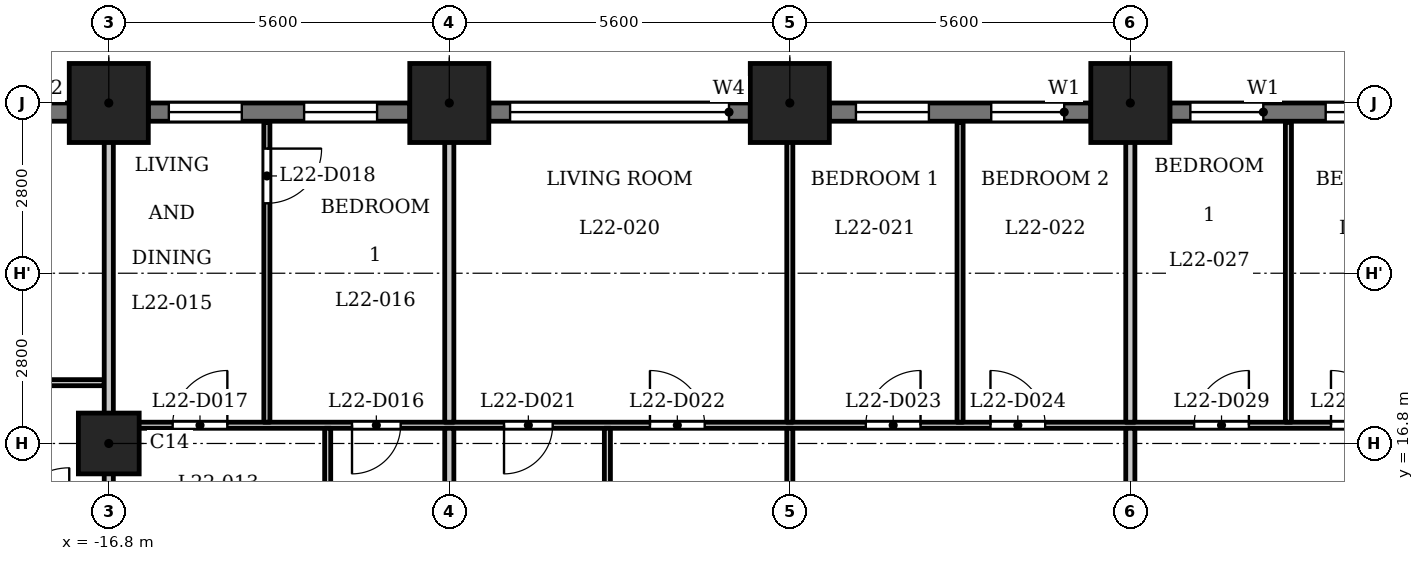
"""IFC4 building model, lengths in metres.
Left out: names, types, materials, properties, quantities, classifications, styles, units other than length and angle.
Written with IfcOpenShell. Run it as: python <this file> out.ifc"""

import sys

from ifc_helpers import new_model, si_unit, direction, frame, frame_2d, origin, origin_2d, place, context, subcontext, project, spatial, rectangle, extrude, element, fill, save


model = new_model("IFC4")
c1 = context("Model", 3, precision=1e-05, world=origin(), true_north=direction((0.0, 1.0)))
c2 = subcontext(c1, "Body", "Model", "MODEL_VIEW")
j1 = project(units=[si_unit("LENGTHUNIT", "METRE"), si_unit("PLANEANGLEUNIT", "RADIAN")], contexts=[c1])
p1 = place(None, origin())
s1 = spatial("IfcSite", under=j1, at=p1, CompositionType="ELEMENT")
p2 = place(p1, origin())
s2 = spatial("IfcBuilding", under=s1, at=p2, CompositionType="ELEMENT")
p3 = place(p2, frame((0.0, 0.0, 90.3)))
s3 = spatial("IfcBuildingStorey", under=s2, at=p3, CompositionType="ELEMENT", Elevation=90.3)
for number, where, z_axis, x_axis in (
    (1, (0.0, 22.4, 0.0), (0.0, 0.0, 1.0), (1.0, 0.0, 0.0)),
    (2, (-5.6, 22.4, 0.0), (0.0, 0.0, 1.0), (1.0, 0.0, 0.0)),
    (3, (-11.2, 22.4, 0.0), (0.0, 0.0, 1.0), (1.0, 0.0, 0.0)),
    (4, (-16.8, 22.4, 0.0), (0.0, 0.0, 1.0), (1.0, 0.0, 0.0)),
):
    element("IfcColumn", number, at=place(p3, frame(where, z_axis=z_axis, x_axis=x_axis)), inside=s3, PredefinedType="COLUMN", context=c2, shape_type="SweptSolid", body=[
        extrude(rectangle(XDim=1.3, YDim=1.3, at=origin_2d()), origin(), (0.0, 0.0, 1.0), 3.5),
    ])
p4 = place(p3, frame((-16.8, 16.8, 0.0), z_axis=(0.0, 0.0, 1.0), x_axis=(1.0, 0.0, 0.0)))
e5 = element("IfcColumn", 5, at=p4, inside=s3, PredefinedType="COLUMN", context=c2, shape_type="SweptSolid", body=[
    extrude(rectangle(XDim=1.0, YDim=1.0, at=origin_2d()), origin(), (0.0, 0.0, 1.0), 3.5),
])
p5 = place(p3, frame((4.95, 22.25, 0.0), z_axis=(0.0, 0.0, 1.0), x_axis=(-1.0, 0.0, 0.0)))
e6 = element("IfcWall", 6, at=p5, inside=s3, PredefinedType="SOLIDWALL", context=c2, shape_type="SweptSolid", body=[
    extrude(rectangle(XDim=4.3, YDim=0.3, at=frame_2d((2.15, 0.0))), origin(), (0.0, 0.0, 1.0), 2.4),
])
p6 = place(p5, frame((0.538, 0.0, 0.6)))
e7 = element("IfcOpeningElement", 7, at=p6, cuts=e6, PredefinedType="OPENING", context=c2, shape_type="SweptSolid", body=[
    extrude(rectangle(XDim=1.2, YDim=1.55, at=frame_2d((0.6, 0.775))), frame((0.0, 0.16, 0.0), z_axis=(0.0, -1.0, 0.0), x_axis=(1.0, 0.0, 0.0)), (0.0, 0.0, 1.0), 0.32),
])
p7 = place(p5, frame((2.762, 0.0, 0.6)))
e8 = element("IfcOpeningElement", 8, at=p7, cuts=e6, PredefinedType="OPENING", context=c2, shape_type="SweptSolid", body=[
    extrude(rectangle(XDim=1.2, YDim=1.55, at=frame_2d((0.6, 0.775))), frame((0.0, 0.16, 0.0), z_axis=(0.0, -1.0, 0.0), x_axis=(1.0, 0.0, 0.0)), (0.0, 0.0, 1.0), 0.32),
])
p8 = place(p3, frame((-0.65, 22.25, 0.0), z_axis=(0.0, 0.0, 1.0), x_axis=(-1.0, 0.0, 0.0)))
e9 = element("IfcWall", 9, at=p8, inside=s3, PredefinedType="SOLIDWALL", context=c2, shape_type="SweptSolid", body=[
    extrude(rectangle(XDim=4.3, YDim=0.3, at=frame_2d((2.15, 0.0))), origin(), (0.0, 0.0, 1.0), 2.4),
])
p9 = place(p8, frame((0.438, 0.0, 0.6)))
e10 = element("IfcOpeningElement", 10, at=p9, cuts=e9, PredefinedType="OPENING", context=c2, shape_type="SweptSolid", body=[
    extrude(rectangle(XDim=1.2, YDim=1.55, at=frame_2d((0.6, 0.775))), frame((0.0, 0.16, 0.0), z_axis=(0.0, -1.0, 0.0), x_axis=(1.0, 0.0, 0.0)), (0.0, 0.0, 1.0), 0.32),
])
p10 = place(p8, frame((2.663, 0.0, 0.6)))
e11 = element("IfcOpeningElement", 11, at=p10, cuts=e9, PredefinedType="OPENING", context=c2, shape_type="SweptSolid", body=[
    extrude(rectangle(XDim=1.2, YDim=1.55, at=frame_2d((0.6, 0.775))), frame((0.0, 0.16, 0.0), z_axis=(0.0, -1.0, 0.0), x_axis=(1.0, 0.0, 0.0)), (0.0, 0.0, 1.0), 0.32),
])
p11 = place(p3, frame((-6.25, 22.25, 0.0), z_axis=(0.0, 0.0, 1.0), x_axis=(-1.0, 0.0, 0.0)))
e12 = element("IfcWall", 12, at=p11, inside=s3, PredefinedType="SOLIDWALL", context=c2, shape_type="SweptSolid", body=[
    extrude(rectangle(XDim=4.3, YDim=0.3, at=frame_2d((2.15, 0.0))), origin(), (0.0, 0.0, 1.0), 2.4),
])
p12 = place(p11, frame((0.35, 0.0, 1.2)))
e13 = element("IfcOpeningElement", 13, at=p12, cuts=e12, PredefinedType="OPENING", context=c2, shape_type="SweptSolid", body=[
    extrude(rectangle(XDim=3.6, YDim=0.95, at=frame_2d((1.8, 0.475))), frame((0.0, 0.16, 0.0), z_axis=(0.0, -1.0, 0.0), x_axis=(1.0, 0.0, 0.0)), (0.0, 0.0, 1.0), 0.32),
])
p13 = place(p3, frame((-11.85, 22.25, 0.0), z_axis=(0.0, 0.0, 1.0), x_axis=(-1.0, 0.0, 0.0)))
e14 = element("IfcWall", 14, at=p13, inside=s3, PredefinedType="SOLIDWALL", context=c2, shape_type="SweptSolid", body=[
    extrude(rectangle(XDim=4.3, YDim=0.3, at=frame_2d((2.15, 0.0))), origin(), (0.0, 0.0, 1.0), 2.4),
])
p14 = place(p13, frame((0.538, 0.0, 0.6)))
e15 = element("IfcOpeningElement", 15, at=p14, cuts=e14, PredefinedType="OPENING", context=c2, shape_type="SweptSolid", body=[
    extrude(rectangle(XDim=1.2, YDim=1.55, at=frame_2d((0.6, 0.775))), frame((0.0, 0.16, 0.0), z_axis=(0.0, -1.0, 0.0), x_axis=(1.0, 0.0, 0.0)), (0.0, 0.0, 1.0), 0.32),
])
p15 = place(p13, frame((2.762, 0.0, 0.6)))
e16 = element("IfcOpeningElement", 16, at=p15, cuts=e14, PredefinedType="OPENING", context=c2, shape_type="SweptSolid", body=[
    extrude(rectangle(XDim=1.2, YDim=1.55, at=frame_2d((0.6, 0.775))), frame((0.0, 0.16, 0.0), z_axis=(0.0, -1.0, 0.0), x_axis=(1.0, 0.0, 0.0)), (0.0, 0.0, 1.0), 0.32),
])
p16 = place(p3, frame((-17.45, 22.25, 0.0), z_axis=(0.0, 0.0, 1.0), x_axis=(-1.0, 0.0, 0.0)))
e17 = element("IfcWall", 17, at=p16, inside=s3, PredefinedType="SOLIDWALL", context=c2, shape_type="SweptSolid", body=[
    extrude(rectangle(XDim=2.55, YDim=0.3, at=frame_2d((1.275, 0.0))), origin(), (0.0, 0.0, 1.0), 2.4),
])
p17 = place(p16, frame((0.375, 0.0, 0.9)))
e18 = element("IfcOpeningElement", 18, at=p17, cuts=e17, PredefinedType="OPENING", context=c2, shape_type="SweptSolid", body=[
    extrude(rectangle(XDim=1.8, YDim=1.25, at=frame_2d((0.9, 0.625))), frame((0.0, 0.16, 0.0), z_axis=(0.0, -1.0, 0.0), x_axis=(1.0, 0.0, 0.0)), (0.0, 0.0, 1.0), 0.32),
])
p18 = place(p3, frame((-16.725, 17.1, 0.0), z_axis=(0.0, 0.0, 1.0), x_axis=(1.0, 0.0, 0.0)))
e19 = element("IfcWall", 19, at=p18, inside=s3, PredefinedType="PARTITIONING", context=c2, shape_type="SweptSolid", body=[
    extrude(rectangle(XDim=33.45, YDim=0.1, at=frame_2d((16.725, 0.0))), origin(), (0.0, 0.0, 1.0), 3.2),
])
p19 = place(p18, frame((3.925, 0.0, 0.0)))
e20 = element("IfcOpeningElement", 20, at=p19, cuts=e19, PredefinedType="OPENING", context=c2, shape_type="SweptSolid", body=[
    extrude(rectangle(XDim=0.8, YDim=2.1, at=frame_2d((0.4, 1.05))), frame((0.0, 0.06, 0.0), z_axis=(0.0, -1.0, 0.0), x_axis=(1.0, 0.0, 0.0)), (0.0, 0.0, 1.0), 0.12),
])
p20 = place(p18, frame((0.975, 0.0, 0.0)))
e21 = element("IfcOpeningElement", 21, at=p20, cuts=e19, PredefinedType="OPENING", context=c2, shape_type="SweptSolid", body=[
    extrude(rectangle(XDim=0.9, YDim=2.1, at=frame_2d((0.45, 1.05))), frame((0.0, 0.06, 0.0), z_axis=(0.0, -1.0, 0.0), x_axis=(1.0, 0.0, 0.0)), (0.0, 0.0, 1.0), 0.12),
])
p21 = place(p18, frame((6.425, 0.0, 0.0)))
e22 = element("IfcOpeningElement", 22, at=p21, cuts=e19, PredefinedType="OPENING", context=c2, shape_type="SweptSolid", body=[
    extrude(rectangle(XDim=0.8, YDim=2.1, at=frame_2d((0.4, 1.05))), frame((0.0, 0.06, 0.0), z_axis=(0.0, -1.0, 0.0), x_axis=(1.0, 0.0, 0.0)), (0.0, 0.0, 1.0), 0.12),
])
p22 = place(p18, frame((8.825, 0.0, 0.0)))
e23 = element("IfcOpeningElement", 23, at=p22, cuts=e19, PredefinedType="OPENING", context=c2, shape_type="SweptSolid", body=[
    extrude(rectangle(XDim=0.9, YDim=2.1, at=frame_2d((0.45, 1.05))), frame((0.0, 0.06, 0.0), z_axis=(0.0, -1.0, 0.0), x_axis=(1.0, 0.0, 0.0)), (0.0, 0.0, 1.0), 0.12),
])
p23 = place(p18, frame((12.375, 0.0, 0.0)))
e24 = element("IfcOpeningElement", 24, at=p23, cuts=e19, PredefinedType="OPENING", context=c2, shape_type="SweptSolid", body=[
    extrude(rectangle(XDim=0.9, YDim=2.1, at=frame_2d((0.45, 1.05))), frame((0.0, 0.06, 0.0), z_axis=(0.0, -1.0, 0.0), x_axis=(1.0, 0.0, 0.0)), (0.0, 0.0, 1.0), 0.12),
])
p24 = place(p18, frame((14.425, 0.0, 0.0)))
e25 = element("IfcOpeningElement", 25, at=p24, cuts=e19, PredefinedType="OPENING", context=c2, shape_type="SweptSolid", body=[
    extrude(rectangle(XDim=0.9, YDim=2.1, at=frame_2d((0.45, 1.05))), frame((0.0, 0.06, 0.0), z_axis=(0.0, -1.0, 0.0), x_axis=(1.0, 0.0, 0.0)), (0.0, 0.0, 1.0), 0.12),
])
p25 = place(p18, frame((26.225, 0.0, 0.0)))
e26 = element("IfcOpeningElement", 26, at=p25, cuts=e19, PredefinedType="OPENING", context=c2, shape_type="SweptSolid", body=[
    extrude(rectangle(XDim=0.8, YDim=2.1, at=frame_2d((0.4, 1.05))), frame((0.0, 0.06, 0.0), z_axis=(0.0, -1.0, 0.0), x_axis=(1.0, 0.0, 0.0)), (0.0, 0.0, 1.0), 0.12),
])
p26 = place(p18, frame((23.025, 0.0, 0.0)))
e27 = element("IfcOpeningElement", 27, at=p26, cuts=e19, PredefinedType="OPENING", context=c2, shape_type="SweptSolid", body=[
    extrude(rectangle(XDim=0.9, YDim=2.1, at=frame_2d((0.45, 1.05))), frame((0.0, 0.06, 0.0), z_axis=(0.0, -1.0, 0.0), x_axis=(1.0, 0.0, 0.0)), (0.0, 0.0, 1.0), 0.12),
])
p27 = place(p18, frame((17.775, 0.0, 0.0)))
e28 = element("IfcOpeningElement", 28, at=p27, cuts=e19, PredefinedType="OPENING", context=c2, shape_type="SweptSolid", body=[
    extrude(rectangle(XDim=0.9, YDim=2.1, at=frame_2d((0.45, 1.05))), frame((0.0, 0.06, 0.0), z_axis=(0.0, -1.0, 0.0), x_axis=(1.0, 0.0, 0.0)), (0.0, 0.0, 1.0), 0.12),
])
p28 = place(p18, frame((20.025, 0.0, 0.0)))
e29 = element("IfcOpeningElement", 29, at=p28, cuts=e19, PredefinedType="OPENING", context=c2, shape_type="SweptSolid", body=[
    extrude(rectangle(XDim=0.9, YDim=2.1, at=frame_2d((0.45, 1.05))), frame((0.0, 0.06, 0.0), z_axis=(0.0, -1.0, 0.0), x_axis=(1.0, 0.0, 0.0)), (0.0, 0.0, 1.0), 0.12),
])
p29 = place(p18, frame((28.825, 0.0, 0.0)))
e30 = element("IfcOpeningElement", 30, at=p29, cuts=e19, PredefinedType="OPENING", context=c2, shape_type="SweptSolid", body=[
    extrude(rectangle(XDim=0.8, YDim=2.1, at=frame_2d((0.4, 1.05))), frame((0.0, 0.06, 0.0), z_axis=(0.0, -1.0, 0.0), x_axis=(1.0, 0.0, 0.0)), (0.0, 0.0, 1.0), 0.12),
])
p30 = place(p18, frame((31.975, 0.0, 0.0)))
e31 = element("IfcOpeningElement", 31, at=p30, cuts=e19, PredefinedType="OPENING", context=c2, shape_type="SweptSolid", body=[
    extrude(rectangle(XDim=0.9, YDim=2.1, at=frame_2d((0.45, 1.05))), frame((0.0, 0.06, 0.0), z_axis=(0.0, -1.0, 0.0), x_axis=(1.0, 0.0, 0.0)), (0.0, 0.0, 1.0), 0.12),
])
p31 = place(p3, frame((-26.554, 17.8, 0.0), z_axis=(0.0, 0.0, 1.0), x_axis=(1.0, 0.0, 0.0)))
e32 = element("IfcWall", 32, at=p31, inside=s3, PredefinedType="PARTITIONING", context=c2, shape_type="SweptSolid", body=[
    extrude(rectangle(XDim=9.679, YDim=0.1, at=frame_2d((4.84, 0.0))), origin(), (0.0, 0.0, 1.0), 3.2),
])
p32 = place(p31, frame((2.786, 0.0, 0.0)))
e33 = element("IfcOpeningElement", 33, at=p32, cuts=e32, PredefinedType="OPENING", context=c2, shape_type="SweptSolid", body=[
    extrude(rectangle(XDim=0.8, YDim=2.1, at=frame_2d((0.4, 1.05))), frame((0.0, 0.06, 0.0), z_axis=(0.0, -1.0, 0.0), x_axis=(1.0, 0.0, 0.0)), (0.0, 0.0, 1.0), 0.12),
])
p33 = place(p31, frame((7.204, 0.0, 0.0)))
e34 = element("IfcOpeningElement", 34, at=p33, cuts=e32, PredefinedType="OPENING", context=c2, shape_type="SweptSolid", body=[
    extrude(rectangle(XDim=0.9, YDim=2.1, at=frame_2d((0.45, 1.05))), frame((0.0, 0.06, 0.0), z_axis=(0.0, -1.0, 0.0), x_axis=(1.0, 0.0, 0.0)), (0.0, 0.0, 1.0), 0.12),
])
p34 = place(p3, frame((-16.8, 15.475, 0.0), z_axis=(0.0, 0.0, 1.0), x_axis=(0.0, 1.0, 0.0)))
e35 = element("IfcWall", 35, at=p34, inside=s3, PredefinedType="PARTITIONING", context=c2, shape_type="SweptSolid", body=[
    extrude(rectangle(XDim=7.555, YDim=0.15, at=frame_2d((3.777, 0.0))), origin(), (0.0, 0.0, 1.0), 3.2),
])
p35 = place(p3, frame((-14.2, 17.15, 0.0), z_axis=(0.0, 0.0, 1.0), x_axis=(0.0, 1.0, 0.0)))
e36 = element("IfcWall", 36, at=p35, inside=s3, PredefinedType="PARTITIONING", context=c2, shape_type="SweptSolid", body=[
    extrude(rectangle(XDim=4.93, YDim=0.1, at=frame_2d((2.465, 0.0))), origin(), (0.0, 0.0, 1.0), 3.2),
])
p36 = place(p35, frame((3.6, 0.0, 0.0)))
e37 = element("IfcOpeningElement", 37, at=p36, cuts=e36, PredefinedType="OPENING", context=c2, shape_type="SweptSolid", body=[
    extrude(rectangle(XDim=0.9, YDim=2.1, at=frame_2d((0.45, 1.05))), frame((0.0, 0.06, 0.0), z_axis=(0.0, -1.0, 0.0), x_axis=(1.0, 0.0, 0.0)), (0.0, 0.0, 1.0), 0.12),
])
p37 = place(p3, frame((-13.2, 13.275, 0.0), z_axis=(0.0, 0.0, 1.0), x_axis=(0.0, 1.0, 0.0)))
e38 = element("IfcWall", 38, at=p37, inside=s3, PredefinedType="PARTITIONING", context=c2, shape_type="SweptSolid", body=[
    extrude(rectangle(XDim=3.775, YDim=0.1, at=frame_2d((1.888, 0.0))), origin(), (0.0, 0.0, 1.0), 3.2),
])
p38 = place(p3, frame((-11.2, 13.275, 0.0), z_axis=(0.0, 0.0, 1.0), x_axis=(0.0, 1.0, 0.0)))
e39 = element("IfcWall", 39, at=p38, inside=s3, PredefinedType="PARTITIONING", context=c2, shape_type="SweptSolid", body=[
    extrude(rectangle(XDim=3.775, YDim=0.15, at=frame_2d((1.888, 0.0))), origin(), (0.0, 0.0, 1.0), 3.2),
])
p39 = place(p3, frame((-11.2, 17.15, 0.0), z_axis=(0.0, 0.0, 1.0), x_axis=(0.0, 1.0, 0.0)))
e40 = element("IfcWall", 40, at=p39, inside=s3, PredefinedType="PARTITIONING", context=c2, shape_type="SweptSolid", body=[
    extrude(rectangle(XDim=5.88, YDim=0.15, at=frame_2d((2.94, 0.0))), origin(), (0.0, 0.0, 1.0), 3.2),
])
p40 = place(p3, frame((-8.6, 13.275, 0.0), z_axis=(0.0, 0.0, 1.0), x_axis=(0.0, 1.0, 0.0)))
e41 = element("IfcWall", 41, at=p40, inside=s3, PredefinedType="PARTITIONING", context=c2, shape_type="SweptSolid", body=[
    extrude(rectangle(XDim=3.775, YDim=0.1, at=frame_2d((1.888, 0.0))), origin(), (0.0, 0.0, 1.0), 3.2),
])
p41 = place(p3, frame((-5.6, 13.275, 0.0), z_axis=(0.0, 0.0, 1.0), x_axis=(0.0, 1.0, 0.0)))
e42 = element("IfcWall", 42, at=p41, inside=s3, PredefinedType="PARTITIONING", context=c2, shape_type="SweptSolid", body=[
    extrude(rectangle(XDim=3.775, YDim=0.1, at=frame_2d((1.888, 0.0))), origin(), (0.0, 0.0, 1.0), 3.2),
])
p42 = place(p41, frame((0.525, 0.0, 0.0)))
e43 = element("IfcOpeningElement", 43, at=p42, cuts=e42, PredefinedType="OPENING", context=c2, shape_type="SweptSolid", body=[
    extrude(rectangle(XDim=0.9, YDim=2.1, at=frame_2d((0.45, 1.05))), frame((0.0, 0.06, 0.0), z_axis=(0.0, -1.0, 0.0), x_axis=(1.0, 0.0, 0.0)), (0.0, 0.0, 1.0), 0.12),
])
p43 = place(p3, frame((-5.6, 17.15, 0.0), z_axis=(0.0, 0.0, 1.0), x_axis=(0.0, 1.0, 0.0)))
e44 = element("IfcWall", 44, at=p43, inside=s3, PredefinedType="PARTITIONING", context=c2, shape_type="SweptSolid", body=[
    extrude(rectangle(XDim=5.88, YDim=0.1, at=frame_2d((2.94, 0.0))), origin(), (0.0, 0.0, 1.0), 3.2),
])
p44 = place(p3, frame((-2.8, 17.15, 0.0), z_axis=(0.0, 0.0, 1.0), x_axis=(0.0, 1.0, 0.0)))
e45 = element("IfcWall", 45, at=p44, inside=s3, PredefinedType="PARTITIONING", context=c2, shape_type="SweptSolid", body=[
    extrude(rectangle(XDim=4.93, YDim=0.1, at=frame_2d((2.465, 0.0))), origin(), (0.0, 0.0, 1.0), 3.2),
])
p45 = place(p3, frame((0.0, 13.275, 0.0), z_axis=(0.0, 0.0, 1.0), x_axis=(0.0, 1.0, 0.0)))
e46 = element("IfcWall", 46, at=p45, inside=s3, PredefinedType="PARTITIONING", context=c2, shape_type="SweptSolid", body=[
    extrude(rectangle(XDim=3.775, YDim=0.15, at=frame_2d((1.888, 0.0))), origin(), (0.0, 0.0, 1.0), 3.2),
])
p46 = place(p3, frame((0.0, 17.15, 0.0), z_axis=(0.0, 0.0, 1.0), x_axis=(0.0, 1.0, 0.0)))
e47 = element("IfcWall", 47, at=p46, inside=s3, PredefinedType="PARTITIONING", context=c2, shape_type="SweptSolid", body=[
    extrude(rectangle(XDim=5.88, YDim=0.15, at=frame_2d((2.94, 0.0))), origin(), (0.0, 0.0, 1.0), 3.2),
])
p47 = place(p3, frame((2.6, 17.15, 0.0), z_axis=(0.0, 0.0, 1.0), x_axis=(0.0, 1.0, 0.0)))
e48 = element("IfcWall", 48, at=p47, inside=s3, PredefinedType="PARTITIONING", context=c2, shape_type="SweptSolid", body=[
    extrude(rectangle(XDim=4.93, YDim=0.1, at=frame_2d((2.465, 0.0))), origin(), (0.0, 0.0, 1.0), 3.2),
])
p48 = place(p19, origin())
e49 = element("IfcDoor", 49, at=p48, inside=s3, OperationType="SINGLE_SWING_LEFT", PredefinedType="DOOR", context=c2, shape_type="SweptSolid", body=[
    extrude(rectangle(XDim=0.8, YDim=2.1, at=frame_2d((0.4, 1.05))), frame((0.0, 0.025, 0.0), z_axis=(0.0, -1.0, 0.0), x_axis=(1.0, 0.0, 0.0)), (0.0, 0.0, 1.0), 0.05),
])
fill(e20, e49)
p49 = place(p20, origin())
e50 = element("IfcDoor", 50, at=p49, inside=s3, OperationType="SINGLE_SWING_LEFT", PredefinedType="DOOR", context=c2, shape_type="SweptSolid", body=[
    extrude(rectangle(XDim=0.9, YDim=2.1, at=frame_2d((0.45, 1.05))), frame((0.0, 0.025, 0.0), z_axis=(0.0, -1.0, 0.0), x_axis=(1.0, 0.0, 0.0)), (0.0, 0.0, 1.0), 0.05),
])
fill(e21, e50)
p50 = place(p36, origin())
e51 = element("IfcDoor", 51, at=p50, inside=s3, OperationType="SINGLE_SWING_RIGHT", PredefinedType="DOOR", context=c2, shape_type="SweptSolid", body=[
    extrude(rectangle(XDim=0.9, YDim=2.1, at=frame_2d((0.45, 1.05))), frame((0.0, 0.025, 0.0), z_axis=(0.0, -1.0, 0.0), x_axis=(1.0, 0.0, 0.0)), (0.0, 0.0, 1.0), 0.05),
])
fill(e37, e51)
p51 = place(p21, origin())
e52 = element("IfcDoor", 52, at=p51, inside=s3, OperationType="SINGLE_SWING_LEFT", PredefinedType="DOOR", context=c2, shape_type="SweptSolid", body=[
    extrude(rectangle(XDim=0.8, YDim=2.1, at=frame_2d((0.4, 1.05))), frame((0.0, 0.025, 0.0), z_axis=(0.0, -1.0, 0.0), x_axis=(1.0, 0.0, 0.0)), (0.0, 0.0, 1.0), 0.05),
])
fill(e22, e52)
p52 = place(p22, origin())
e53 = element("IfcDoor", 53, at=p52, inside=s3, OperationType="SINGLE_SWING_RIGHT", PredefinedType="DOOR", context=c2, shape_type="SweptSolid", body=[
    extrude(rectangle(XDim=0.9, YDim=2.1, at=frame_2d((0.45, 1.05))), frame((0.0, 0.025, 0.0), z_axis=(0.0, -1.0, 0.0), x_axis=(1.0, 0.0, 0.0)), (0.0, 0.0, 1.0), 0.05),
])
fill(e23, e53)
p53 = place(p23, origin())
e54 = element("IfcDoor", 54, at=p53, inside=s3, OperationType="SINGLE_SWING_LEFT", PredefinedType="DOOR", context=c2, shape_type="SweptSolid", body=[
    extrude(rectangle(XDim=0.9, YDim=2.1, at=frame_2d((0.45, 1.05))), frame((0.0, 0.025, 0.0), z_axis=(0.0, -1.0, 0.0), x_axis=(1.0, 0.0, 0.0)), (0.0, 0.0, 1.0), 0.05),
])
fill(e24, e54)
p54 = place(p24, origin())
e55 = element("IfcDoor", 55, at=p54, inside=s3, OperationType="SINGLE_SWING_RIGHT", PredefinedType="DOOR", context=c2, shape_type="SweptSolid", body=[
    extrude(rectangle(XDim=0.9, YDim=2.1, at=frame_2d((0.45, 1.05))), frame((0.0, 0.025, 0.0), z_axis=(0.0, -1.0, 0.0), x_axis=(1.0, 0.0, 0.0)), (0.0, 0.0, 1.0), 0.05),
])
fill(e25, e55)
p55 = place(p27, origin())
e56 = element("IfcDoor", 56, at=p55, inside=s3, OperationType="SINGLE_SWING_LEFT", PredefinedType="DOOR", context=c2, shape_type="SweptSolid", body=[
    extrude(rectangle(XDim=0.9, YDim=2.1, at=frame_2d((0.45, 1.05))), frame((0.0, 0.025, 0.0), z_axis=(0.0, -1.0, 0.0), x_axis=(1.0, 0.0, 0.0)), (0.0, 0.0, 1.0), 0.05),
])
fill(e28, e56)
p56 = place(p28, origin())
e57 = element("IfcDoor", 57, at=p56, inside=s3, OperationType="SINGLE_SWING_RIGHT", PredefinedType="DOOR", context=c2, shape_type="SweptSolid", body=[
    extrude(rectangle(XDim=0.9, YDim=2.1, at=frame_2d((0.45, 1.05))), frame((0.0, 0.025, 0.0), z_axis=(0.0, -1.0, 0.0), x_axis=(1.0, 0.0, 0.0)), (0.0, 0.0, 1.0), 0.05),
])
fill(e29, e57)
p57 = place(p6, origin())
e58 = element("IfcWindow", 58, at=p57, inside=s3, PartitioningType="SINGLE_PANEL", PredefinedType="WINDOW", context=c2, shape_type="SweptSolid", body=[
    extrude(rectangle(XDim=1.2, YDim=1.55, at=frame_2d((0.6, 0.775))), frame((0.0, 0.03, 0.0), z_axis=(0.0, -1.0, 0.0), x_axis=(1.0, 0.0, 0.0)), (0.0, 0.0, 1.0), 0.06),
])
fill(e7, e58)
p58 = place(p7, origin())
e59 = element("IfcWindow", 59, at=p58, inside=s3, PartitioningType="SINGLE_PANEL", PredefinedType="WINDOW", context=c2, shape_type="SweptSolid", body=[
    extrude(rectangle(XDim=1.2, YDim=1.55, at=frame_2d((0.6, 0.775))), frame((0.0, 0.03, 0.0), z_axis=(0.0, -1.0, 0.0), x_axis=(1.0, 0.0, 0.0)), (0.0, 0.0, 1.0), 0.06),
])
fill(e8, e59)
p59 = place(p9, origin())
e60 = element("IfcWindow", 60, at=p59, inside=s3, PartitioningType="SINGLE_PANEL", PredefinedType="WINDOW", context=c2, shape_type="SweptSolid", body=[
    extrude(rectangle(XDim=1.2, YDim=1.55, at=frame_2d((0.6, 0.775))), frame((0.0, 0.03, 0.0), z_axis=(0.0, -1.0, 0.0), x_axis=(1.0, 0.0, 0.0)), (0.0, 0.0, 1.0), 0.06),
])
fill(e10, e60)
p60 = place(p10, origin())
e61 = element("IfcWindow", 61, at=p60, inside=s3, PartitioningType="SINGLE_PANEL", PredefinedType="WINDOW", context=c2, shape_type="SweptSolid", body=[
    extrude(rectangle(XDim=1.2, YDim=1.55, at=frame_2d((0.6, 0.775))), frame((0.0, 0.03, 0.0), z_axis=(0.0, -1.0, 0.0), x_axis=(1.0, 0.0, 0.0)), (0.0, 0.0, 1.0), 0.06),
])
fill(e11, e61)
p61 = place(p12, origin())
e62 = element("IfcWindow", 62, at=p61, inside=s3, PartitioningType="SINGLE_PANEL", PredefinedType="WINDOW", context=c2, shape_type="SweptSolid", body=[
    extrude(rectangle(XDim=3.6, YDim=0.95, at=frame_2d((1.8, 0.475))), frame((0.0, 0.03, 0.0), z_axis=(0.0, -1.0, 0.0), x_axis=(1.0, 0.0, 0.0)), (0.0, 0.0, 1.0), 0.06),
])
fill(e13, e62)
p62 = place(p14, origin())
e63 = element("IfcWindow", 63, at=p62, inside=s3, PartitioningType="SINGLE_PANEL", PredefinedType="WINDOW", context=c2, shape_type="SweptSolid", body=[
    extrude(rectangle(XDim=1.2, YDim=1.55, at=frame_2d((0.6, 0.775))), frame((0.0, 0.03, 0.0), z_axis=(0.0, -1.0, 0.0), x_axis=(1.0, 0.0, 0.0)), (0.0, 0.0, 1.0), 0.06),
])
fill(e15, e63)
p63 = place(p15, origin())
e64 = element("IfcWindow", 64, at=p63, inside=s3, PartitioningType="SINGLE_PANEL", PredefinedType="WINDOW", context=c2, shape_type="SweptSolid", body=[
    extrude(rectangle(XDim=1.2, YDim=1.55, at=frame_2d((0.6, 0.775))), frame((0.0, 0.03, 0.0), z_axis=(0.0, -1.0, 0.0), x_axis=(1.0, 0.0, 0.0)), (0.0, 0.0, 1.0), 0.06),
])
fill(e16, e64)
save(model, sys.argv[1])
